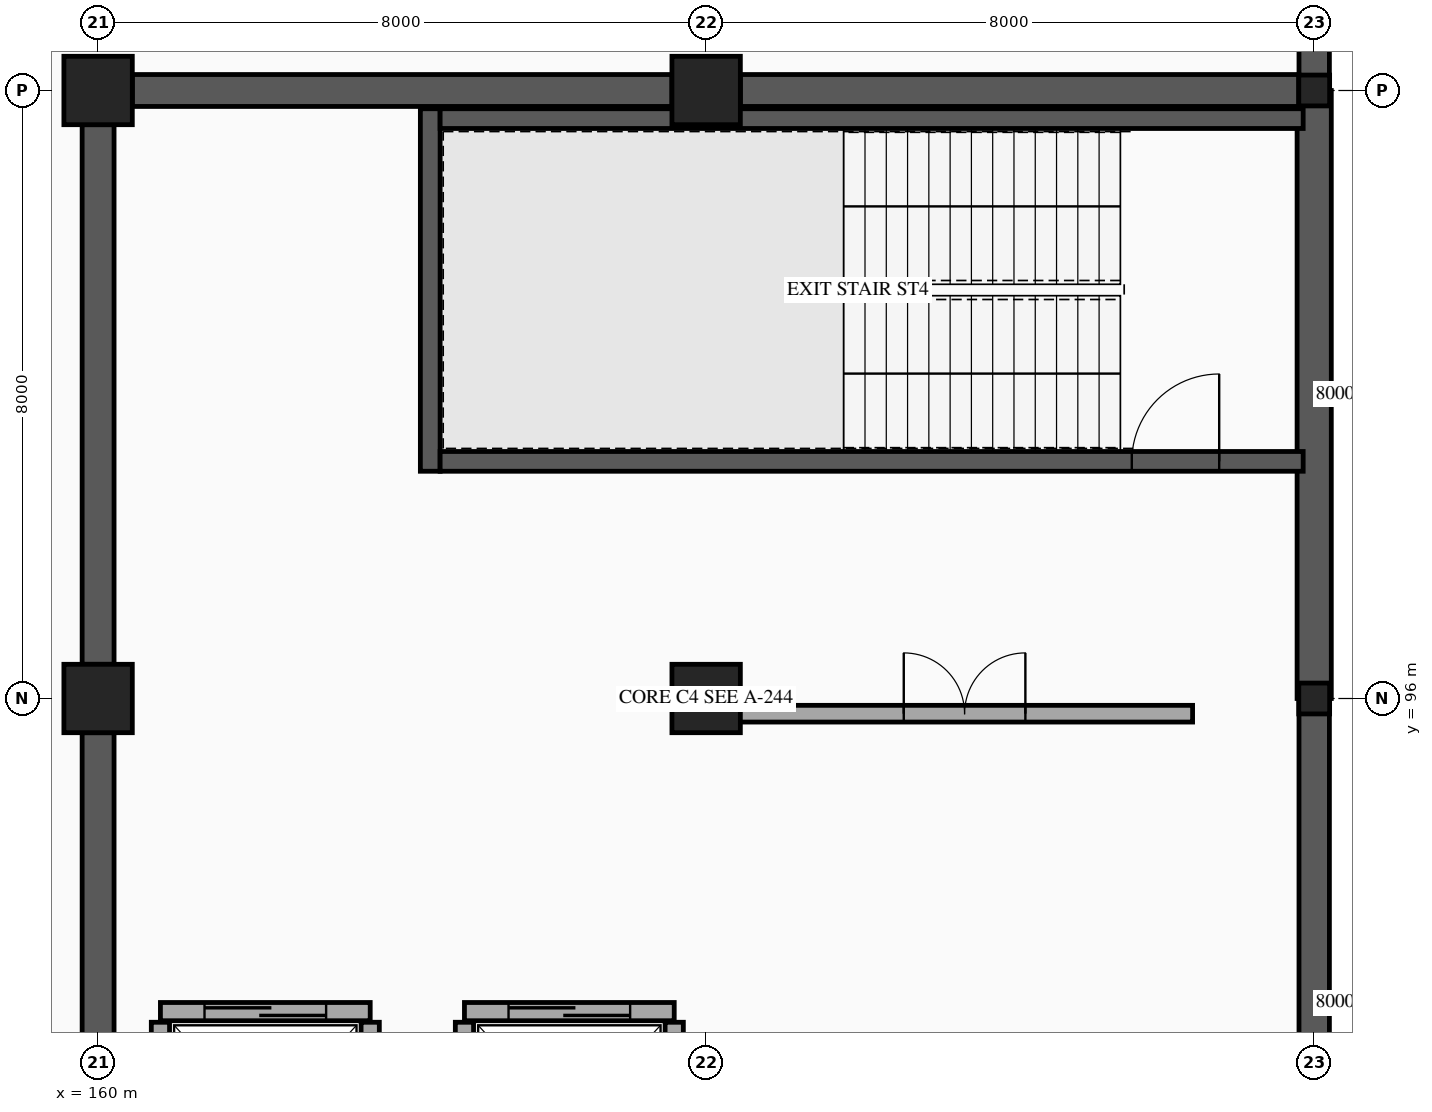
"""IFC4 building model, lengths in metres.
Left out: names, types, materials, properties, quantities, classifications, styles, units other than length and angle.
Written with IfcOpenShell. Run it as: python <this file> out.ifc"""

import sys

from ifc_helpers import new_model, si_unit, direction, frame, frame_2d, origin, origin_2d, place, context, subcontext, project, spatial, rectangle, hollow_rectangle, extrude, element, fill, save


model = new_model("IFC4")
c1 = context("Model", 3, precision=1e-05, world=origin(), true_north=direction((0.0, 1.0)))
c2 = subcontext(c1, "Body", "Model", "MODEL_VIEW")
j1 = project(units=[si_unit("LENGTHUNIT", "METRE"), si_unit("PLANEANGLEUNIT", "RADIAN")], contexts=[c1])
p1 = place(None, origin())
s1 = spatial("IfcSite", under=j1, at=p1, CompositionType="ELEMENT")
p2 = place(p1, origin())
s2 = spatial("IfcBuilding", under=s1, at=p2, CompositionType="ELEMENT")
p3 = place(p2, frame((0.0, 0.0, -4.8)))
s3 = spatial("IfcBuildingStorey", under=s2, at=p3, CompositionType="ELEMENT", Elevation=-4.8)
for number, where, z_axis, x_axis in (
    (1, (160.0, 96.0, 0.0), (0.0, 0.0, 1.0), (1.0, 0.0, 0.0)),
    (2, (160.0, 104.0, 0.0), (0.0, 0.0, 1.0), (1.0, 0.0, 0.0)),
    (3, (168.0, 96.0, 0.0), (0.0, 0.0, 1.0), (1.0, 0.0, 0.0)),
    (4, (168.0, 104.0, 0.0), (0.0, 0.0, 1.0), (1.0, 0.0, 0.0)),
):
    element("IfcColumn", number, at=place(p3, frame(where, z_axis=z_axis, x_axis=x_axis)), inside=s3, PredefinedType="COLUMN", context=c2, shape_type="SweptSolid", body=[
        extrude(rectangle(XDim=0.9, YDim=0.9, at=origin_2d()), origin(), (0.0, 0.0, 1.0), 4.8),
    ])
for number, where, z_axis, x_axis in (
    (5, (176.0, 96.0, 0.0), (0.0, 0.0, 1.0), (1.0, 0.0, 0.0)),
    (6, (176.0, 104.0, 0.0), (0.0, 0.0, 1.0), (1.0, 0.0, 0.0)),
):
    element("IfcColumn", number, at=place(p3, frame(where, z_axis=z_axis, x_axis=x_axis)), inside=s3, PredefinedType="COLUMN", context=c2, shape_type="SweptSolid", body=[
        extrude(hollow_rectangle(XDim=0.406, YDim=0.406, WallThickness=0.015, InnerFilletRadius=0.015, OuterFilletRadius=0.029, at=origin_2d()), origin(), (0.0, 0.0, 1.0), 4.8),
    ])
p4 = place(p3, frame((176.0, 112.0, 0.0), z_axis=(0.0, 0.0, 1.0), x_axis=(0.0, -1.0, 0.0)))
e7 = element("IfcWall", 7, at=p4, inside=s3, PredefinedType="USERDEFINED", context=c2, shape_type="SweptSolid", body=[
    extrude(rectangle(XDim=8.0, YDim=0.4, at=frame_2d((4.0, 0.0))), origin(), (0.0, 0.0, 1.0), 4.5),
])
p5 = place(p3, frame((176.0, 104.0, 0.0), z_axis=(0.0, 0.0, 1.0), x_axis=(0.0, -1.0, 0.0)))
e8 = element("IfcWall", 8, at=p5, inside=s3, PredefinedType="USERDEFINED", context=c2, shape_type="SweptSolid", body=[
    extrude(rectangle(XDim=8.0, YDim=0.45, at=frame_2d((4.0, 0.0))), origin(), (0.0, 0.0, 1.0), 4.5),
])
p6 = place(p3, frame((176.0, 96.0, 0.0), z_axis=(0.0, 0.0, 1.0), x_axis=(0.0, -1.0, 0.0)))
e9 = element("IfcWall", 9, at=p6, inside=s3, PredefinedType="USERDEFINED", context=c2, shape_type="SweptSolid", body=[
    extrude(rectangle(XDim=8.0, YDim=0.4, at=frame_2d((4.0, 0.0))), origin(), (0.0, 0.0, 1.0), 4.5),
])
p7 = place(p3, frame((164.37, 98.99, 0.0), z_axis=(0.0, 0.0, 1.0), x_axis=(0.0, 1.0, 0.0)))
e10 = element("IfcWall", 10, at=p7, inside=s3, PredefinedType="SHEAR", context=c2, shape_type="SweptSolid", body=[
    extrude(rectangle(XDim=4.77, YDim=0.26, at=frame_2d((2.385, 0.0))), origin(), (0.0, 0.0, 1.0), 4.58),
])
p8 = place(p3, frame((164.5, 99.12, 0.0), z_axis=(0.0, 0.0, 1.0), x_axis=(1.0, 0.0, 0.0)))
e11 = element("IfcWall", 11, at=p8, inside=s3, PredefinedType="SHEAR", context=c2, shape_type="SweptSolid", body=[
    extrude(rectangle(XDim=11.355, YDim=0.26, at=frame_2d((5.677, 0.0))), origin(), (0.0, 0.0, 1.0), 4.58),
])
p9 = place(p8, frame((9.1, 0.0, 0.0)))
e12 = element("IfcOpeningElement", 12, at=p9, cuts=e11, PredefinedType="OPENING", context=c2, shape_type="SweptSolid", body=[
    extrude(rectangle(XDim=1.15, YDim=2.15, at=frame_2d((0.575, 1.075))), frame((0.0, 0.14, 0.0), z_axis=(0.0, -1.0, 0.0), x_axis=(1.0, 0.0, 0.0)), (0.0, 0.0, 1.0), 0.28),
])
p10 = place(p3, frame((164.5, 103.63, 0.0), z_axis=(0.0, 0.0, 1.0), x_axis=(1.0, 0.0, 0.0)))
e13 = element("IfcWall", 13, at=p10, inside=s3, PredefinedType="SHEAR", context=c2, shape_type="SweptSolid", body=[
    extrude(rectangle(XDim=11.355, YDim=0.26, at=frame_2d((5.677, 0.0))), origin(), (0.0, 0.0, 1.0), 4.58),
])
p11 = place(p3, frame((160.45, 104.0, 0.0), z_axis=(0.0, 0.0, 1.0), x_axis=(1.0, 0.0, 0.0)))
e14 = element("IfcWall", 14, at=p11, inside=s3, PredefinedType="SHEAR", context=c2, shape_type="SweptSolid", body=[
    extrude(rectangle(XDim=7.1, YDim=0.42, at=frame_2d((3.55, 0.0))), origin(), (0.0, 0.0, 1.0), 4.58),
])
p12 = place(p3, frame((168.45, 104.0, 0.0), z_axis=(0.0, 0.0, 1.0), x_axis=(1.0, 0.0, 0.0)))
e15 = element("IfcWall", 15, at=p12, inside=s3, PredefinedType="SHEAR", context=c2, shape_type="SweptSolid", body=[
    extrude(rectangle(XDim=7.347, YDim=0.42, at=frame_2d((3.674, 0.0))), origin(), (0.0, 0.0, 1.0), 4.58),
])
for number, where, z_axis, x_axis in (
    (16, (160.0, 88.45, 0.0), (0.0, 0.0, 1.0), (0.0, 1.0, 0.0)),
    (17, (160.0, 96.45, 0.0), (0.0, 0.0, 1.0), (0.0, 1.0, 0.0)),
):
    element("IfcWall", number, at=place(p3, frame(where, z_axis=z_axis, x_axis=x_axis)), inside=s3, PredefinedType="SHEAR", context=c2, shape_type="SweptSolid", body=[
        extrude(rectangle(XDim=7.1, YDim=0.42, at=frame_2d((3.55, 0.0))), origin(), (0.0, 0.0, 1.0), 4.58),
    ])
p13 = place(p3, frame((164.82, 91.88, 0.0), z_axis=(0.0, 0.0, 1.0), x_axis=(1.0, 0.0, 0.0)))
e18 = element("IfcWall", 18, at=p13, inside=s3, PredefinedType="PARTITIONING", context=c2, shape_type="SweptSolid", body=[
    extrude(rectangle(XDim=2.76, YDim=0.24, at=frame_2d((1.38, 0.0))), origin(), (0.0, 0.0, 1.0), 4.58),
])
p14 = place(p13, frame((0.58, 0.0, 0.0)))
e19 = element("IfcOpeningElement", 19, at=p14, cuts=e18, PredefinedType="OPENING", context=c2, shape_type="SweptSolid", body=[
    extrude(rectangle(XDim=1.6, YDim=2.3, at=frame_2d((0.8, 1.15))), frame((0.0, 0.13, 0.0), z_axis=(0.0, -1.0, 0.0), x_axis=(1.0, 0.0, 0.0)), (0.0, 0.0, 1.0), 0.26),
])
for number, where, z_axis, x_axis in (
    (20, (164.82, 89.06, 0.0), (0.0, 0.0, 1.0), (0.0, 1.0, 0.0)),
    (21, (167.58, 89.06, 0.0), (0.0, 0.0, 1.0), (0.0, 1.0, 0.0)),
):
    element("IfcWall", number, at=place(p3, frame(where, z_axis=z_axis, x_axis=x_axis)), inside=s3, PredefinedType="PARTITIONING", context=c2, shape_type="SweptSolid", body=[
        extrude(rectangle(XDim=2.68, YDim=0.24, at=frame_2d((1.34, 0.0))), origin(), (0.0, 0.0, 1.0), 4.58),
    ])
p15 = place(p3, frame((160.82, 91.88, 0.0), z_axis=(0.0, 0.0, 1.0), x_axis=(1.0, 0.0, 0.0)))
e22 = element("IfcWall", 22, at=p15, inside=s3, PredefinedType="PARTITIONING", context=c2, shape_type="SweptSolid", body=[
    extrude(rectangle(XDim=2.76, YDim=0.24, at=frame_2d((1.38, 0.0))), origin(), (0.0, 0.0, 1.0), 4.58),
])
p16 = place(p15, frame((0.58, 0.0, 0.0)))
e23 = element("IfcOpeningElement", 23, at=p16, cuts=e22, PredefinedType="OPENING", context=c2, shape_type="SweptSolid", body=[
    extrude(rectangle(XDim=1.6, YDim=2.3, at=frame_2d((0.8, 1.15))), frame((0.0, 0.13, 0.0), z_axis=(0.0, -1.0, 0.0), x_axis=(1.0, 0.0, 0.0)), (0.0, 0.0, 1.0), 0.26),
])
for number, where, z_axis, x_axis in (
    (24, (160.82, 89.06, 0.0), (0.0, 0.0, 1.0), (0.0, 1.0, 0.0)),
    (25, (163.58, 89.06, 0.0), (0.0, 0.0, 1.0), (0.0, 1.0, 0.0)),
):
    element("IfcWall", number, at=place(p3, frame(where, z_axis=z_axis, x_axis=x_axis)), inside=s3, PredefinedType="PARTITIONING", context=c2, shape_type="SweptSolid", body=[
        extrude(rectangle(XDim=2.68, YDim=0.24, at=frame_2d((1.34, 0.0))), origin(), (0.0, 0.0, 1.0), 4.58),
    ])
p17 = place(p3, frame((168.4, 95.8, 0.0), z_axis=(0.0, 0.0, 1.0), x_axis=(1.0, 0.0, 0.0)))
e26 = element("IfcWall", 26, at=p17, inside=s3, PredefinedType="PARTITIONING", context=c2, shape_type="SweptSolid", body=[
    extrude(rectangle(XDim=6.0, YDim=0.22, at=frame_2d((3.0, 0.0))), origin(), (0.0, 0.0, 1.0), 3.78),
])
p18 = place(p17, frame((2.2, 0.0, 0.0)))
e27 = element("IfcOpeningElement", 27, at=p18, cuts=e26, PredefinedType="OPENING", context=c2, shape_type="SweptSolid", body=[
    extrude(rectangle(XDim=1.6, YDim=2.15, at=frame_2d((0.8, 1.075))), frame((0.0, 0.12, 0.0), z_axis=(0.0, -1.0, 0.0), x_axis=(1.0, 0.0, 0.0)), (0.0, 0.0, 1.0), 0.24),
])
p19 = place(p9, origin())
e28 = element("IfcDoor", 28, at=p19, inside=s3, OperationType="SINGLE_SWING_RIGHT", PredefinedType="DOOR", context=c2, shape_type="SweptSolid", body=[
    extrude(rectangle(XDim=1.15, YDim=2.15, at=frame_2d((0.575, 1.075))), frame((0.0, 0.025, 0.0), z_axis=(0.0, -1.0, 0.0), x_axis=(1.0, 0.0, 0.0)), (0.0, 0.0, 1.0), 0.05),
])
fill(e12, e28)
p20 = place(p14, origin())
e29 = element("IfcDoor", 29, at=p20, inside=s3, OperationType="SLIDING_TO_LEFT", PredefinedType="DOOR", context=c2, shape_type="SweptSolid", body=[
    extrude(rectangle(XDim=1.6, YDim=2.3, at=frame_2d((0.8, 1.15))), frame((0.0, 0.025, 0.0), z_axis=(0.0, -1.0, 0.0), x_axis=(1.0, 0.0, 0.0)), (0.0, 0.0, 1.0), 0.05),
])
fill(e19, e29)
p21 = place(p16, origin())
e30 = element("IfcDoor", 30, at=p21, inside=s3, OperationType="SLIDING_TO_LEFT", PredefinedType="DOOR", context=c2, shape_type="SweptSolid", body=[
    extrude(rectangle(XDim=1.6, YDim=2.3, at=frame_2d((0.8, 1.15))), frame((0.0, 0.025, 0.0), z_axis=(0.0, -1.0, 0.0), x_axis=(1.0, 0.0, 0.0)), (0.0, 0.0, 1.0), 0.05),
])
fill(e23, e30)
p22 = place(p18, origin())
e31 = element("IfcDoor", 31, at=p22, inside=s3, OperationType="DOUBLE_DOOR_SINGLE_SWING", PredefinedType="DOOR", context=c2, shape_type="SweptSolid", body=[
    extrude(rectangle(XDim=1.6, YDim=2.15, at=frame_2d((0.8, 1.075))), frame((0.0, 0.025, 0.0), z_axis=(0.0, -1.0, 0.0), x_axis=(1.0, 0.0, 0.0)), (0.0, 0.0, 1.0), 0.05),
])
fill(e27, e31)
save(model, sys.argv[1])
